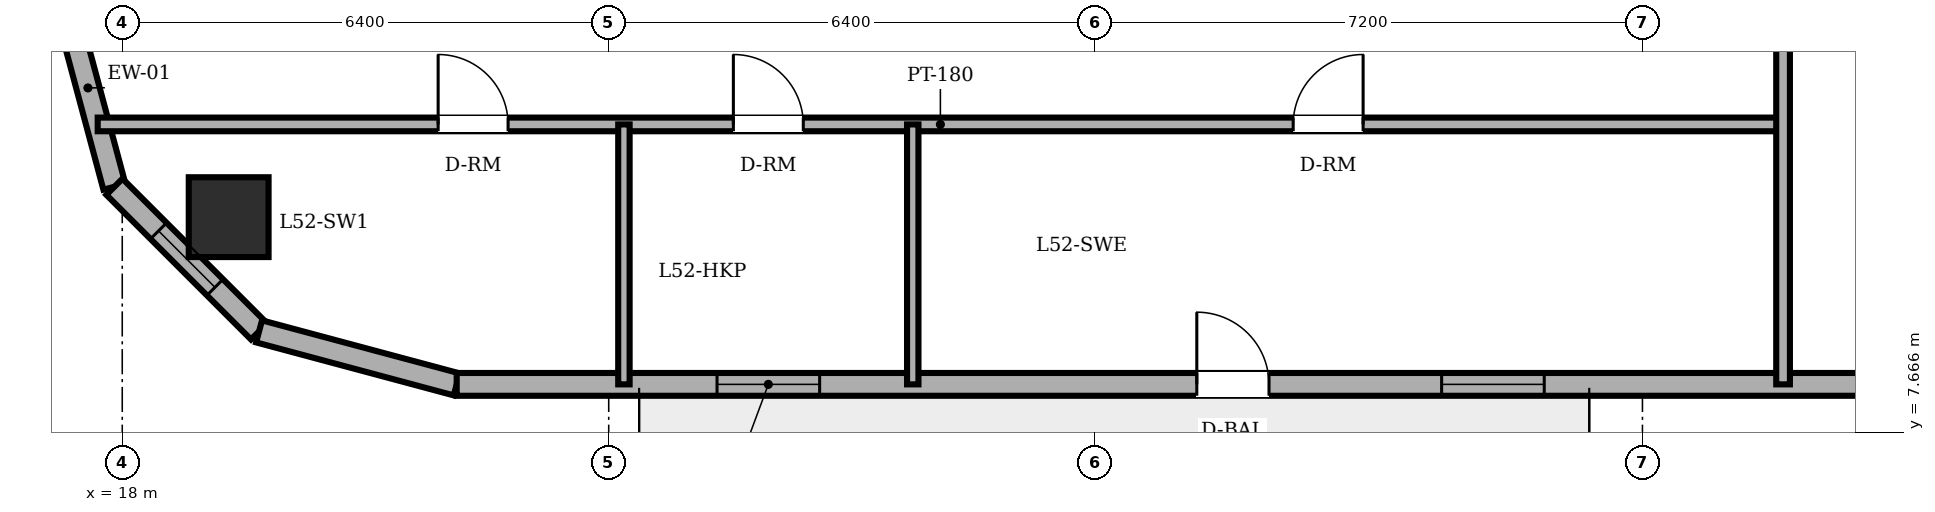
"""IFC4 building model, lengths in metres.
Left out: names, types, materials, properties, quantities, classifications, styles, units other than length and angle.
Written with IfcOpenShell. Run it as: python <this file> out.ifc"""

import sys

from ifc_helpers import new_model, si_unit, direction, frame, frame_2d, origin, origin_2d, place, context, subcontext, project, spatial, rectangle, circle, extrude, element, fill, save


model = new_model("IFC4")
c1 = context("Model", 3, precision=1e-05, world=origin(), true_north=direction((0.0, 1.0)))
c2 = subcontext(c1, "Body", "Model", "MODEL_VIEW")
j1 = project(units=[si_unit("LENGTHUNIT", "METRE"), si_unit("PLANEANGLEUNIT", "RADIAN")], contexts=[c1])
p1 = place(None, origin())
s1 = spatial("IfcSite", under=j1, at=p1, CompositionType="ELEMENT")
p2 = place(p1, origin())
s2 = spatial("IfcBuilding", under=s1, at=p2, CompositionType="ELEMENT")
p3 = place(p2, frame((0.0, 0.0, 201.3)))
s3 = spatial("IfcBuildingStorey", under=s2, at=p3, CompositionType="ELEMENT", Elevation=201.3)
p4 = place(p3, frame((19.4, 10.5, 0.0), z_axis=(0.0, 0.0, 1.0), x_axis=(1.0, 0.0, 0.0)))
e1 = element("IfcColumn", 1, at=p4, inside=s3, PredefinedType="COLUMN", context=c2, shape_type="SweptSolid", body=[
    extrude(circle(Radius=0.525, at=origin_2d()), origin(), (0.0, 0.0, 1.0), 3.6),
])
p5 = place(p3, frame((17.2, 13.5, 0.0), z_axis=(0.0, 0.0, 1.0), x_axis=(0.258932525951, -0.965895412042, 0.0)))
e2 = element("IfcWall", 2, at=p5, inside=s3, PredefinedType="SOLIDWALL", context=c2, shape_type="SweptSolid", body=[
    extrude(rectangle(XDim=2.692, YDim=0.3, at=frame_2d((1.346, 0.0))), origin(), (0.0, 0.0, 1.0), 3.4),
])
p6 = place(p3, frame((17.897, 10.9, 0.0), z_axis=(0.0, 0.0, 1.0), x_axis=(0.707152139074, -0.70706142039, 0.0)))
e3 = element("IfcWall", 3, at=p6, inside=s3, PredefinedType="SOLIDWALL", context=c2, shape_type="SweptSolid", body=[
    extrude(rectangle(XDim=2.691, YDim=0.3, at=frame_2d((1.346, 0.0))), origin(), (0.0, 0.0, 1.0), 3.4),
])
p7 = place(p6, frame((0.821, 0.0, 0.85)))
e4 = element("IfcOpeningElement", 4, at=p7, cuts=e3, PredefinedType="OPENING", context=c2, shape_type="SweptSolid", body=[
    extrude(rectangle(XDim=1.05, YDim=1.55, at=frame_2d((0.525, 0.775))), frame((0.0, 0.16, 0.0), z_axis=(0.0, -1.0, 0.0), x_axis=(1.0, 0.0, 0.0)), (0.0, 0.0, 1.0), 0.32),
])
p8 = place(p3, frame((19.8, 8.997, 0.0), z_axis=(0.0, 0.0, 1.0), x_axis=(0.965889330541, -0.258955210695, 0.0)))
e5 = element("IfcWall", 5, at=p8, inside=s3, PredefinedType="SOLIDWALL", context=c2, shape_type="SweptSolid", body=[
    extrude(rectangle(XDim=2.692, YDim=0.3, at=frame_2d((1.346, 0.0))), origin(), (0.0, 0.0, 1.0), 3.4),
])
p9 = place(p3, frame((22.4, 8.3, 0.0), z_axis=(0.0, 0.0, 1.0), x_axis=(1.0, 0.0, 0.0)))
e6 = element("IfcWall", 6, at=p9, inside=s3, PredefinedType="SOLIDWALL", context=c2, shape_type="SweptSolid", body=[
    extrude(rectangle(XDim=32.485, YDim=0.3, at=frame_2d((16.243, 0.0))), origin(), (0.0, 0.0, 1.0), 3.4),
])
p10 = place(p9, frame((9.737, 0.0, 0.0)))
e7 = element("IfcOpeningElement", 7, at=p10, cuts=e6, PredefinedType="OPENING", context=c2, shape_type="SweptSolid", body=[
    extrude(rectangle(XDim=0.95, YDim=2.2, at=frame_2d((0.475, 1.1))), frame((0.0, 0.16, 0.0), z_axis=(0.0, -1.0, 0.0), x_axis=(1.0, 0.0, 0.0)), (0.0, 0.0, 1.0), 0.32),
])
p11 = place(p9, frame((3.425, 0.0, 0.85)))
e8 = element("IfcOpeningElement", 8, at=p11, cuts=e6, PredefinedType="OPENING", context=c2, shape_type="SweptSolid", body=[
    extrude(rectangle(XDim=1.35, YDim=1.55, at=frame_2d((0.675, 0.775))), frame((0.0, 0.16, 0.0), z_axis=(0.0, -1.0, 0.0), x_axis=(1.0, 0.0, 0.0)), (0.0, 0.0, 1.0), 0.32),
])
p12 = place(p9, frame((12.958, 0.0, 0.85)))
e9 = element("IfcOpeningElement", 9, at=p12, cuts=e6, PredefinedType="OPENING", context=c2, shape_type="SweptSolid", body=[
    extrude(rectangle(XDim=1.35, YDim=1.55, at=frame_2d((0.675, 0.775))), frame((0.0, 0.16, 0.0), z_axis=(0.0, -1.0, 0.0), x_axis=(1.0, 0.0, 0.0)), (0.0, 0.0, 1.0), 0.32),
])
p13 = place(p9, frame((21.67, 0.0, 0.85)))
e10 = element("IfcOpeningElement", 10, at=p13, cuts=e6, PredefinedType="OPENING", context=c2, shape_type="SweptSolid", body=[
    extrude(rectangle(XDim=1.35, YDim=1.55, at=frame_2d((0.675, 0.775))), frame((0.0, 0.16, 0.0), z_axis=(0.0, -1.0, 0.0), x_axis=(1.0, 0.0, 0.0)), (0.0, 0.0, 1.0), 0.32),
])
p14 = place(p9, frame((26.565, 0.0, 0.85)))
e11 = element("IfcOpeningElement", 11, at=p14, cuts=e6, PredefinedType="OPENING", context=c2, shape_type="SweptSolid", body=[
    extrude(rectangle(XDim=1.35, YDim=1.55, at=frame_2d((0.675, 0.775))), frame((0.0, 0.16, 0.0), z_axis=(0.0, -1.0, 0.0), x_axis=(1.0, 0.0, 0.0)), (0.0, 0.0, 1.0), 0.32),
])
p15 = place(p3, frame((17.677, 11.72, 0.0), z_axis=(0.0, 0.0, 1.0), x_axis=(1.0, 0.0, 0.0)))
e12 = element("IfcWall", 12, at=p15, inside=s3, PredefinedType="PARTITIONING", context=c2, shape_type="SweptSolid", body=[
    extrude(rectangle(XDim=22.173, YDim=0.18, at=frame_2d((11.086, 0.0))), origin(), (0.0, 0.0, 1.0), 3.4),
])
p16 = place(p15, frame((8.363, 0.0, 0.0)))
e13 = element("IfcOpeningElement", 13, at=p16, cuts=e12, PredefinedType="OPENING", context=c2, shape_type="SweptSolid", body=[
    extrude(rectangle(XDim=0.92, YDim=2.1, at=frame_2d((0.46, 1.05))), frame((0.0, 0.1, 0.0), z_axis=(0.0, -1.0, 0.0), x_axis=(1.0, 0.0, 0.0)), (0.0, 0.0, 1.0), 0.2),
])
p17 = place(p15, frame((4.479, 0.0, 0.0)))
e14 = element("IfcOpeningElement", 14, at=p17, cuts=e12, PredefinedType="OPENING", context=c2, shape_type="SweptSolid", body=[
    extrude(rectangle(XDim=0.92, YDim=2.1, at=frame_2d((0.46, 1.05))), frame((0.0, 0.1, 0.0), z_axis=(0.0, -1.0, 0.0), x_axis=(1.0, 0.0, 0.0)), (0.0, 0.0, 1.0), 0.2),
])
p18 = place(p15, frame((15.728, 0.0, 0.0)))
e15 = element("IfcOpeningElement", 15, at=p18, cuts=e12, PredefinedType="OPENING", context=c2, shape_type="SweptSolid", body=[
    extrude(rectangle(XDim=0.92, YDim=2.1, at=frame_2d((0.46, 1.05))), frame((0.0, 0.1, 0.0), z_axis=(0.0, -1.0, 0.0), x_axis=(1.0, 0.0, 0.0)), (0.0, 0.0, 1.0), 0.2),
])
for number, where, z_axis, x_axis in (
    (16, (24.6, 8.3, 0.0), (0.0, 0.0, 1.0), (0.0, 1.0, 0.0)),
    (17, (28.4, 8.3, 0.0), (0.0, 0.0, 1.0), (0.0, 1.0, 0.0)),
):
    element("IfcWall", number, at=place(p3, frame(where, z_axis=z_axis, x_axis=x_axis)), inside=s3, PredefinedType="PARTITIONING", context=c2, shape_type="SweptSolid", body=[
        extrude(rectangle(XDim=3.42, YDim=0.15, at=frame_2d((1.71, 0.0))), origin(), (0.0, 0.0, 1.0), 3.4),
    ])
p19 = place(p3, frame((39.85, 8.3, 0.0), z_axis=(0.0, 0.0, 1.0), x_axis=(0.0, 1.0, 0.0)))
e18 = element("IfcWall", 18, at=p19, inside=s3, PredefinedType="PARTITIONING", context=c2, shape_type="SweptSolid", body=[
    extrude(rectangle(XDim=14.52, YDim=0.18, at=frame_2d((7.26, 0.0))), origin(), (0.0, 0.0, 1.0), 3.4),
])
p20 = place(p10, origin())
e19 = element("IfcDoor", 19, at=p20, inside=s3, OperationType="SINGLE_SWING_LEFT", PredefinedType="DOOR", context=c2, shape_type="SweptSolid", body=[
    extrude(rectangle(XDim=0.95, YDim=2.2, at=frame_2d((0.475, 1.1))), frame((0.0, 0.025, 0.0), z_axis=(0.0, -1.0, 0.0), x_axis=(1.0, 0.0, 0.0)), (0.0, 0.0, 1.0), 0.05),
])
fill(e7, e19)
p21 = place(p11, origin())
e20 = element("IfcWindow", 20, at=p21, inside=s3, PartitioningType="SINGLE_PANEL", PredefinedType="WINDOW", context=c2, shape_type="SweptSolid", body=[
    extrude(rectangle(XDim=1.35, YDim=1.55, at=frame_2d((0.675, 0.775))), frame((0.0, 0.03, 0.0), z_axis=(0.0, -1.0, 0.0), x_axis=(1.0, 0.0, 0.0)), (0.0, 0.0, 1.0), 0.06),
])
fill(e8, e20)
p22 = place(p12, origin())
e21 = element("IfcWindow", 21, at=p22, inside=s3, PartitioningType="SINGLE_PANEL", PredefinedType="WINDOW", context=c2, shape_type="SweptSolid", body=[
    extrude(rectangle(XDim=1.35, YDim=1.55, at=frame_2d((0.675, 0.775))), frame((0.0, 0.03, 0.0), z_axis=(0.0, -1.0, 0.0), x_axis=(1.0, 0.0, 0.0)), (0.0, 0.0, 1.0), 0.06),
])
fill(e9, e21)
p23 = place(p7, origin())
e22 = element("IfcWindow", 22, at=p23, inside=s3, PartitioningType="SINGLE_PANEL", PredefinedType="WINDOW", context=c2, shape_type="SweptSolid", body=[
    extrude(rectangle(XDim=1.05, YDim=1.55, at=frame_2d((0.525, 0.775))), frame((0.0, 0.03, 0.0), z_axis=(0.0, -1.0, 0.0), x_axis=(1.0, 0.0, 0.0)), (0.0, 0.0, 1.0), 0.06),
])
fill(e4, e22)
p24 = place(p16, origin())
e23 = element("IfcDoor", 23, at=p24, inside=s3, OperationType="SINGLE_SWING_LEFT", PredefinedType="DOOR", context=c2, shape_type="SweptSolid", body=[
    extrude(rectangle(XDim=0.92, YDim=2.1, at=frame_2d((0.46, 1.05))), frame((0.0, 0.025, 0.0), z_axis=(0.0, -1.0, 0.0), x_axis=(1.0, 0.0, 0.0)), (0.0, 0.0, 1.0), 0.05),
])
fill(e13, e23)
p25 = place(p17, origin())
e24 = element("IfcDoor", 24, at=p25, inside=s3, OperationType="SINGLE_SWING_LEFT", PredefinedType="DOOR", context=c2, shape_type="SweptSolid", body=[
    extrude(rectangle(XDim=0.92, YDim=2.1, at=frame_2d((0.46, 1.05))), frame((0.0, 0.025, 0.0), z_axis=(0.0, -1.0, 0.0), x_axis=(1.0, 0.0, 0.0)), (0.0, 0.0, 1.0), 0.05),
])
fill(e14, e24)
p26 = place(p18, origin())
e25 = element("IfcDoor", 25, at=p26, inside=s3, OperationType="SINGLE_SWING_RIGHT", PredefinedType="DOOR", context=c2, shape_type="SweptSolid", body=[
    extrude(rectangle(XDim=0.92, YDim=2.1, at=frame_2d((0.46, 1.05))), frame((0.0, 0.025, 0.0), z_axis=(0.0, -1.0, 0.0), x_axis=(1.0, 0.0, 0.0)), (0.0, 0.0, 1.0), 0.05),
])
fill(e15, e25)
save(model, sys.argv[1])
